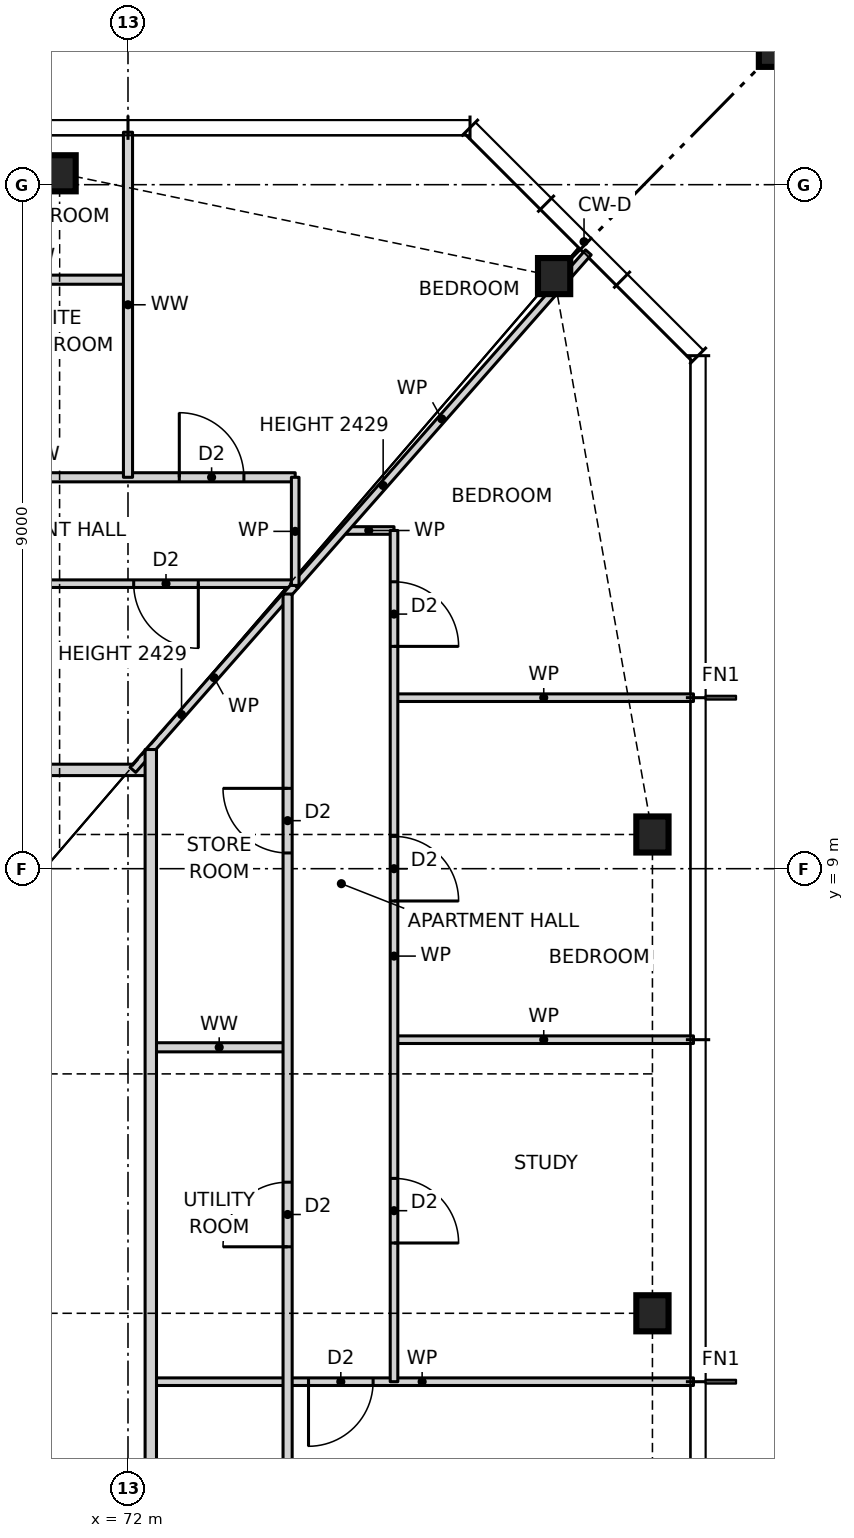
"""IFC4 building model, lengths in metres.
Left out: names, types, materials, properties, quantities, classifications, styles, units other than length and angle.
Written with IfcOpenShell. Run it as: python <this file> out.ifc"""

import sys

from ifc_helpers import new_model, si_unit, direction, frame, frame_2d, origin, origin_2d, place, context, subcontext, project, spatial, rectangle, hollow_rectangle, i_section, extrude, element, fill, save


model = new_model("IFC4")
c1 = context("Model", 3, precision=1e-05, world=origin(), true_north=direction((0.0, 1.0)))
c2 = subcontext(c1, "Body", "Model", "MODEL_VIEW")
j1 = project(units=[si_unit("LENGTHUNIT", "METRE"), si_unit("PLANEANGLEUNIT", "RADIAN")], contexts=[c1])
p1 = place(None, origin())
s1 = spatial("IfcSite", under=j1, at=p1, CompositionType="ELEMENT")
p2 = place(p1, origin())
s2 = spatial("IfcBuilding", under=s1, at=p2, CompositionType="ELEMENT")
p3 = place(p2, frame((0.0, 0.0, 18.5)))
s3 = spatial("IfcBuildingStorey", under=s2, at=p3, CompositionType="ELEMENT", Elevation=18.5)
for number, where, z_axis, x_axis in (
    (1, (78.9, 3.15, 0.0), (0.0, 0.0, 1.0), (1.0, 0.0, 0.0)),
    (2, (78.9, 9.45, 0.0), (0.0, 0.0, 1.0), (1.0, 0.0, 0.0)),
    (3, (77.606, 16.797, 0.0), (0.0, 0.0, 1.0), (1.0, 0.0, 0.0)),
    (4, (71.1, 18.15, 0.0), (0.0, 0.0, 1.0), (1.0, 0.0, 0.0)),
):
    element("IfcColumn", number, at=place(p3, frame(where, z_axis=z_axis, x_axis=x_axis)), inside=s3, PredefinedType="COLUMN", context=c2, shape_type="SweptSolid", body=[
        extrude(i_section(OverallWidth=0.424, OverallDepth=0.475, WebThickness=0.048, FlangeThickness=0.077, at=origin_2d()), origin(), (0.0, 0.0, 1.0), 3.5),
    ])
p4 = place(p3, frame((80.9, 20.15, 0.0), z_axis=(0.0, 0.0, 1.0), x_axis=(1.0, 0.0, 0.0)))
e5 = element("IfcColumn", 5, at=p4, inside=s3, PredefinedType="COLUMN", context=c2, shape_type="SweptSolid", body=[
    extrude(hollow_rectangle(XDim=1.2, YDim=1.2, WallThickness=0.07, at=origin_2d()), origin(), (0.0, 0.0, 1.0), 3.5),
])
p5 = place(p3, frame((72.3, 2.25, 0.0), z_axis=(0.0, 0.0, 1.0), x_axis=(1.0, 0.0, 0.0)))
e6 = element("IfcWall", 6, at=p5, inside=s3, PredefinedType="PARTITIONING", context=c2, shape_type="SweptSolid", body=[
    extrude(rectangle(XDim=7.14, YDim=0.1, at=frame_2d((3.57, 0.0))), origin(), (0.0, 0.0, 1.0), 3.27),
])
p6 = place(p5, frame((2.075, 0.0, 0.0)))
e7 = element("IfcOpeningElement", 7, at=p6, cuts=e6, PredefinedType="OPENING", context=c2, shape_type="SweptSolid", body=[
    extrude(rectangle(XDim=0.85, YDim=2.1, at=frame_2d((0.425, 1.05))), frame((0.0, 0.06, 0.0), z_axis=(0.0, -1.0, 0.0), x_axis=(1.0, 0.0, 0.0)), (0.0, 0.0, 1.0), 0.12),
])
p7 = place(p3, frame((72.3, 6.65, 0.0), z_axis=(0.0, 0.0, 1.0), x_axis=(1.0, 0.0, 0.0)))
e8 = element("IfcWall", 8, at=p7, inside=s3, PredefinedType="PARTITIONING", context=c2, shape_type="SweptSolid", body=[
    extrude(rectangle(XDim=1.8, YDim=0.12, at=frame_2d((0.9, 0.0))), origin(), (0.0, 0.0, 1.0), 3.27),
])
p8 = place(p3, frame((75.5, 6.75, 0.0), z_axis=(0.0, 0.0, 1.0), x_axis=(1.0, 0.0, 0.0)))
e9 = element("IfcWall", 9, at=p8, inside=s3, PredefinedType="PARTITIONING", context=c2, shape_type="SweptSolid", body=[
    extrude(rectangle(XDim=3.94, YDim=0.1, at=frame_2d((1.97, 0.0))), origin(), (0.0, 0.0, 1.0), 3.27),
])
p9 = place(p3, frame((53.7, 10.3, 0.0), z_axis=(0.0, 0.0, 1.0), x_axis=(1.0, 0.0, 0.0)))
e10 = element("IfcWall", 10, at=p9, inside=s3, PredefinedType="PARTITIONING", context=c2, shape_type="SweptSolid", body=[
    extrude(rectangle(XDim=18.6, YDim=0.15, at=frame_2d((9.3, 0.0))), origin(), (0.0, 0.0, 1.0), 3.27),
])
p10 = place(p9, frame((8.3, 0.0, 0.0)))
e11 = element("IfcOpeningElement", 11, at=p10, cuts=e10, PredefinedType="OPENING", context=c2, shape_type="SweptSolid", body=[
    extrude(rectangle(XDim=1.0, YDim=2.1, at=frame_2d((0.5, 1.05))), frame((0.0, 0.085, 0.0), z_axis=(0.0, -1.0, 0.0), x_axis=(1.0, 0.0, 0.0)), (0.0, 0.0, 1.0), 0.17),
])
p11 = place(p3, frame((75.5, 11.25, 0.0), z_axis=(0.0, 0.0, 1.0), x_axis=(1.0, 0.0, 0.0)))
e12 = element("IfcWall", 12, at=p11, inside=s3, PredefinedType="PARTITIONING", context=c2, shape_type="SweptSolid", body=[
    extrude(rectangle(XDim=3.94, YDim=0.1, at=frame_2d((1.97, 0.0))), origin(), (0.0, 0.0, 1.0), 3.27),
])
p12 = place(p3, frame((51.8, 12.75, 0.0), z_axis=(0.0, 0.0, 1.0), x_axis=(1.0, 0.0, 0.0)))
e13 = element("IfcWall", 13, at=p12, inside=s3, PredefinedType="PARTITIONING", context=c2, shape_type="SweptSolid", body=[
    extrude(rectangle(XDim=22.4, YDim=0.1, at=frame_2d((11.2, 0.0))), origin(), (0.0, 0.0, 1.0), 3.27),
])
p13 = place(p12, frame((13.475, 0.0, 0.0)))
e14 = element("IfcOpeningElement", 14, at=p13, cuts=e13, PredefinedType="OPENING", context=c2, shape_type="SweptSolid", body=[
    extrude(rectangle(XDim=0.85, YDim=2.1, at=frame_2d((0.425, 1.05))), frame((0.0, 0.06, 0.0), z_axis=(0.0, -1.0, 0.0), x_axis=(1.0, 0.0, 0.0)), (0.0, 0.0, 1.0), 0.12),
])
p14 = place(p12, frame((10.275, 0.0, 0.0)))
e15 = element("IfcOpeningElement", 15, at=p14, cuts=e13, PredefinedType="OPENING", context=c2, shape_type="SweptSolid", body=[
    extrude(rectangle(XDim=0.85, YDim=2.1, at=frame_2d((0.425, 1.05))), frame((0.0, 0.06, 0.0), z_axis=(0.0, -1.0, 0.0), x_axis=(1.0, 0.0, 0.0)), (0.0, 0.0, 1.0), 0.12),
])
p15 = place(p12, frame((16.925, 0.0, 0.0)))
e16 = element("IfcOpeningElement", 16, at=p15, cuts=e13, PredefinedType="OPENING", context=c2, shape_type="SweptSolid", body=[
    extrude(rectangle(XDim=0.85, YDim=2.1, at=frame_2d((0.425, 1.05))), frame((0.0, 0.06, 0.0), z_axis=(0.0, -1.0, 0.0), x_axis=(1.0, 0.0, 0.0)), (0.0, 0.0, 1.0), 0.12),
])
p16 = place(p12, frame((20.275, 0.0, 0.0)))
e17 = element("IfcOpeningElement", 17, at=p16, cuts=e13, PredefinedType="OPENING", context=c2, shape_type="SweptSolid", body=[
    extrude(rectangle(XDim=0.85, YDim=2.1, at=frame_2d((0.425, 1.05))), frame((0.0, 0.06, 0.0), z_axis=(0.0, -1.0, 0.0), x_axis=(1.0, 0.0, 0.0)), (0.0, 0.0, 1.0), 0.12),
])
p17 = place(p12, frame((4.625, 0.0, 0.0)))
e18 = element("IfcOpeningElement", 18, at=p17, cuts=e13, PredefinedType="OPENING", context=c2, shape_type="SweptSolid", body=[
    extrude(rectangle(XDim=0.85, YDim=2.1, at=frame_2d((0.425, 1.05))), frame((0.0, 0.06, 0.0), z_axis=(0.0, -1.0, 0.0), x_axis=(1.0, 0.0, 0.0)), (0.0, 0.0, 1.0), 0.12),
])
p18 = place(p12, frame((1.275, 0.0, 0.0)))
e19 = element("IfcOpeningElement", 19, at=p18, cuts=e13, PredefinedType="OPENING", context=c2, shape_type="SweptSolid", body=[
    extrude(rectangle(XDim=0.85, YDim=2.1, at=frame_2d((0.425, 1.05))), frame((0.0, 0.06, 0.0), z_axis=(0.0, -1.0, 0.0), x_axis=(1.0, 0.0, 0.0)), (0.0, 0.0, 1.0), 0.12),
])
p19 = place(p3, frame((74.836, 13.45, 0.0), z_axis=(0.0, 0.0, 1.0), x_axis=(1.0, 0.0, 0.0)))
e20 = element("IfcWall", 20, at=p19, inside=s3, PredefinedType="PARTITIONING", context=c2, shape_type="SweptSolid", body=[
    extrude(rectangle(XDim=0.664, YDim=0.1, at=frame_2d((0.332, 0.0))), origin(), (0.0, 0.0, 1.0), 3.27),
])
p20 = place(p3, frame((67.5, 14.15, 0.0), z_axis=(0.0, 0.0, 1.0), x_axis=(1.0, 0.0, 0.0)))
e21 = element("IfcWall", 21, at=p20, inside=s3, PredefinedType="PARTITIONING", context=c2, shape_type="SweptSolid", body=[
    extrude(rectangle(XDim=6.7, YDim=0.12, at=frame_2d((3.35, 0.0))), origin(), (0.0, 0.0, 1.0), 3.27),
])
p21 = place(p20, frame((0.625, 0.0, 0.0)))
e22 = element("IfcOpeningElement", 22, at=p21, cuts=e21, PredefinedType="OPENING", context=c2, shape_type="SweptSolid", body=[
    extrude(rectangle(XDim=0.85, YDim=2.1, at=frame_2d((0.425, 1.05))), frame((0.0, 0.07, 0.0), z_axis=(0.0, -1.0, 0.0), x_axis=(1.0, 0.0, 0.0)), (0.0, 0.0, 1.0), 0.14),
])
p22 = place(p20, frame((5.175, 0.0, 0.0)))
e23 = element("IfcOpeningElement", 23, at=p22, cuts=e21, PredefinedType="OPENING", context=c2, shape_type="SweptSolid", body=[
    extrude(rectangle(XDim=0.85, YDim=2.1, at=frame_2d((0.425, 1.05))), frame((0.0, 0.07, 0.0), z_axis=(0.0, -1.0, 0.0), x_axis=(1.0, 0.0, 0.0)), (0.0, 0.0, 1.0), 0.14),
])
p23 = place(p3, frame((69.6, 16.75, 0.0), z_axis=(0.0, 0.0, 1.0), x_axis=(1.0, 0.0, 0.0)))
e24 = element("IfcWall", 24, at=p23, inside=s3, PredefinedType="PARTITIONING", context=c2, shape_type="SweptSolid", body=[
    extrude(rectangle(XDim=2.4, YDim=0.12, at=frame_2d((1.2, 0.0))), origin(), (0.0, 0.0, 1.0), 3.27),
])
p24 = place(p3, frame((72.064, 10.3, 0.0), z_axis=(0.0, 0.0, 1.0), x_axis=(0.660667046586, 0.75067906162, 0.0)))
e25 = element("IfcWall", 25, at=p24, inside=s3, PredefinedType="PARTITIONING", context=c2, shape_type="SweptSolid", body=[
    extrude(rectangle(XDim=3.233, YDim=0.1, at=frame_2d((1.617, 0.0))), origin(), (0.0, 0.0, 1.0), 2.429),
])
p25 = place(p3, frame((74.2, 12.727, 0.0), z_axis=(0.0, 0.0, 1.0), x_axis=(0.660698595885, 0.750651294141, 0.0)))
e26 = element("IfcWall", 26, at=p25, inside=s3, PredefinedType="PARTITIONING", context=c2, shape_type="SweptSolid", body=[
    extrude(rectangle(XDim=5.838, YDim=0.1, at=frame_2d((2.919, 0.0))), origin(), (0.0, 0.0, 1.0), 2.429),
])
p26 = place(p3, frame((75.5, 2.25, 0.0), z_axis=(0.0, 0.0, 1.0), x_axis=(0.0, 1.0, 0.0)))
e27 = element("IfcWall", 27, at=p26, inside=s3, PredefinedType="PARTITIONING", context=c2, shape_type="SweptSolid", body=[
    extrude(rectangle(XDim=11.2, YDim=0.1, at=frame_2d((5.6, 0.0))), origin(), (0.0, 0.0, 1.0), 3.27),
])
p27 = place(p26, frame((1.825, 0.0, 0.0)))
e28 = element("IfcOpeningElement", 28, at=p27, cuts=e27, PredefinedType="OPENING", context=c2, shape_type="SweptSolid", body=[
    extrude(rectangle(XDim=0.85, YDim=2.1, at=frame_2d((0.425, 1.05))), frame((0.0, 0.06, 0.0), z_axis=(0.0, -1.0, 0.0), x_axis=(1.0, 0.0, 0.0)), (0.0, 0.0, 1.0), 0.12),
])
p28 = place(p26, frame((6.325, 0.0, 0.0)))
e29 = element("IfcOpeningElement", 29, at=p28, cuts=e27, PredefinedType="OPENING", context=c2, shape_type="SweptSolid", body=[
    extrude(rectangle(XDim=0.85, YDim=2.1, at=frame_2d((0.425, 1.05))), frame((0.0, 0.06, 0.0), z_axis=(0.0, -1.0, 0.0), x_axis=(1.0, 0.0, 0.0)), (0.0, 0.0, 1.0), 0.12),
])
p29 = place(p26, frame((9.675, 0.0, 0.0)))
e30 = element("IfcOpeningElement", 30, at=p29, cuts=e27, PredefinedType="OPENING", context=c2, shape_type="SweptSolid", body=[
    extrude(rectangle(XDim=0.85, YDim=2.1, at=frame_2d((0.425, 1.05))), frame((0.0, 0.06, 0.0), z_axis=(0.0, -1.0, 0.0), x_axis=(1.0, 0.0, 0.0)), (0.0, 0.0, 1.0), 0.12),
])
p30 = place(p3, frame((74.2, 12.727, 0.0), z_axis=(0.0, 0.0, 1.0), x_axis=(0.0, 1.0, 0.0)))
e31 = element("IfcWall", 31, at=p30, inside=s3, PredefinedType="PARTITIONING", context=c2, shape_type="SweptSolid", body=[
    extrude(rectangle(XDim=1.423, YDim=0.1, at=frame_2d((0.711, 0.0))), origin(), (0.0, 0.0, 1.0), 3.27),
])
p31 = place(p3, frame((74.1, -12.614, 0.0), z_axis=(0.0, 0.0, 1.0), x_axis=(0.0, 1.0, 0.0)))
e32 = element("IfcWall", 32, at=p31, inside=s3, PredefinedType="PARTITIONING", context=c2, shape_type="SweptSolid", body=[
    extrude(rectangle(XDim=25.228, YDim=0.12, at=frame_2d((12.614, 0.0))), origin(), (0.0, 0.0, 1.0), 3.27),
])
p32 = place(p31, frame((7.239, 0.0, 0.0)))
e33 = element("IfcOpeningElement", 33, at=p32, cuts=e32, PredefinedType="OPENING", context=c2, shape_type="SweptSolid", body=[
    extrude(rectangle(XDim=0.85, YDim=2.1, at=frame_2d((0.425, 1.05))), frame((0.0, 0.07, 0.0), z_axis=(0.0, -1.0, 0.0), x_axis=(1.0, 0.0, 0.0)), (0.0, 0.0, 1.0), 0.14),
])
p33 = place(p31, frame((10.439, 0.0, 0.0)))
e34 = element("IfcOpeningElement", 34, at=p33, cuts=e32, PredefinedType="OPENING", context=c2, shape_type="SweptSolid", body=[
    extrude(rectangle(XDim=0.85, YDim=2.1, at=frame_2d((0.425, 1.05))), frame((0.0, 0.07, 0.0), z_axis=(0.0, -1.0, 0.0), x_axis=(1.0, 0.0, 0.0)), (0.0, 0.0, 1.0), 0.14),
])
p34 = place(p31, frame((2.507, 0.0, 0.0)))
e35 = element("IfcOpeningElement", 35, at=p34, cuts=e32, PredefinedType="OPENING", context=c2, shape_type="SweptSolid", body=[
    extrude(rectangle(XDim=0.85, YDim=2.1, at=frame_2d((0.425, 1.05))), frame((0.0, 0.07, 0.0), z_axis=(0.0, -1.0, 0.0), x_axis=(1.0, 0.0, 0.0)), (0.0, 0.0, 1.0), 0.14),
])
p35 = place(p31, frame((16.639, 0.0, 0.0)))
e36 = element("IfcOpeningElement", 36, at=p35, cuts=e32, PredefinedType="OPENING", context=c2, shape_type="SweptSolid", body=[
    extrude(rectangle(XDim=0.85, YDim=2.1, at=frame_2d((0.425, 1.05))), frame((0.0, 0.07, 0.0), z_axis=(0.0, -1.0, 0.0), x_axis=(1.0, 0.0, 0.0)), (0.0, 0.0, 1.0), 0.14),
])
p36 = place(p31, frame((21.821, 0.0, 0.0)))
e37 = element("IfcOpeningElement", 37, at=p36, cuts=e32, PredefinedType="OPENING", context=c2, shape_type="SweptSolid", body=[
    extrude(rectangle(XDim=0.85, YDim=2.1, at=frame_2d((0.425, 1.05))), frame((0.0, 0.07, 0.0), z_axis=(0.0, -1.0, 0.0), x_axis=(1.0, 0.0, 0.0)), (0.0, 0.0, 1.0), 0.14),
])
p37 = place(p3, frame((72.3, -10.9, 0.0), z_axis=(0.0, 0.0, 1.0), x_axis=(0.0, 1.0, 0.0)))
e38 = element("IfcWall", 38, at=p37, inside=s3, PredefinedType="PARTITIONING", context=c2, shape_type="SweptSolid", body=[
    extrude(rectangle(XDim=21.468, YDim=0.15, at=frame_2d((10.734, 0.0))), origin(), (0.0, 0.0, 1.0), 3.27),
])
p38 = place(p37, frame((8.65, 0.0, 0.0)))
e39 = element("IfcOpeningElement", 39, at=p38, cuts=e38, PredefinedType="OPENING", context=c2, shape_type="SweptSolid", body=[
    extrude(rectangle(XDim=1.0, YDim=2.1, at=frame_2d((0.5, 1.05))), frame((0.0, 0.085, 0.0), z_axis=(0.0, -1.0, 0.0), x_axis=(1.0, 0.0, 0.0)), (0.0, 0.0, 1.0), 0.17),
])
p39 = place(p3, frame((72.0, 14.15, 0.0), z_axis=(0.0, 0.0, 1.0), x_axis=(0.0, 1.0, 0.0)))
e40 = element("IfcWall", 40, at=p39, inside=s3, PredefinedType="PARTITIONING", context=c2, shape_type="SweptSolid", body=[
    extrude(rectangle(XDim=4.54, YDim=0.12, at=frame_2d((2.27, 0.0))), origin(), (0.0, 0.0, 1.0), 3.27),
])
p40 = place(p6, frame((0.85, 0.0, 0.0), z_axis=(0.0, 0.0, 1.0), x_axis=(-1.0, 0.0, 0.0)))
e41 = element("IfcDoor", 41, at=p40, inside=s3, OperationType="SINGLE_SWING_RIGHT", PredefinedType="DOOR", context=c2, shape_type="SweptSolid", body=[
    extrude(rectangle(XDim=0.85, YDim=2.1, at=frame_2d((0.425, 1.05))), frame((0.0, 0.025, 0.0), z_axis=(0.0, -1.0, 0.0), x_axis=(1.0, 0.0, 0.0)), (0.0, 0.0, 1.0), 0.05),
])
fill(e7, e41)
p41 = place(p27, frame((0.85, 0.0, 0.0), z_axis=(0.0, 0.0, 1.0), x_axis=(-1.0, 0.0, 0.0)))
e42 = element("IfcDoor", 42, at=p41, inside=s3, OperationType="SINGLE_SWING_RIGHT", PredefinedType="DOOR", context=c2, shape_type="SweptSolid", body=[
    extrude(rectangle(XDim=0.85, YDim=2.1, at=frame_2d((0.425, 1.05))), frame((0.0, 0.025, 0.0), z_axis=(0.0, -1.0, 0.0), x_axis=(1.0, 0.0, 0.0)), (0.0, 0.0, 1.0), 0.05),
])
fill(e28, e42)
p42 = place(p28, frame((0.85, 0.0, 0.0), z_axis=(0.0, 0.0, 1.0), x_axis=(-1.0, 0.0, 0.0)))
e43 = element("IfcDoor", 43, at=p42, inside=s3, OperationType="SINGLE_SWING_RIGHT", PredefinedType="DOOR", context=c2, shape_type="SweptSolid", body=[
    extrude(rectangle(XDim=0.85, YDim=2.1, at=frame_2d((0.425, 1.05))), frame((0.0, 0.025, 0.0), z_axis=(0.0, -1.0, 0.0), x_axis=(1.0, 0.0, 0.0)), (0.0, 0.0, 1.0), 0.05),
])
fill(e29, e43)
p43 = place(p29, frame((0.85, 0.0, 0.0), z_axis=(0.0, 0.0, 1.0), x_axis=(-1.0, 0.0, 0.0)))
e44 = element("IfcDoor", 44, at=p43, inside=s3, OperationType="SINGLE_SWING_RIGHT", PredefinedType="DOOR", context=c2, shape_type="SweptSolid", body=[
    extrude(rectangle(XDim=0.85, YDim=2.1, at=frame_2d((0.425, 1.05))), frame((0.0, 0.025, 0.0), z_axis=(0.0, -1.0, 0.0), x_axis=(1.0, 0.0, 0.0)), (0.0, 0.0, 1.0), 0.05),
])
fill(e30, e44)
p44 = place(p35, origin())
e45 = element("IfcDoor", 45, at=p44, inside=s3, OperationType="SINGLE_SWING_LEFT", PredefinedType="DOOR", context=c2, shape_type="SweptSolid", body=[
    extrude(rectangle(XDim=0.85, YDim=2.1, at=frame_2d((0.425, 1.05))), frame((0.0, 0.025, 0.0), z_axis=(0.0, -1.0, 0.0), x_axis=(1.0, 0.0, 0.0)), (0.0, 0.0, 1.0), 0.05),
])
fill(e36, e45)
p45 = place(p36, origin())
e46 = element("IfcDoor", 46, at=p45, inside=s3, OperationType="SINGLE_SWING_RIGHT", PredefinedType="DOOR", context=c2, shape_type="SweptSolid", body=[
    extrude(rectangle(XDim=0.85, YDim=2.1, at=frame_2d((0.425, 1.05))), frame((0.0, 0.025, 0.0), z_axis=(0.0, -1.0, 0.0), x_axis=(1.0, 0.0, 0.0)), (0.0, 0.0, 1.0), 0.05),
])
fill(e37, e46)
p46 = place(p22, origin())
e47 = element("IfcDoor", 47, at=p46, inside=s3, OperationType="SINGLE_SWING_LEFT", PredefinedType="DOOR", context=c2, shape_type="SweptSolid", body=[
    extrude(rectangle(XDim=0.85, YDim=2.1, at=frame_2d((0.425, 1.05))), frame((0.0, 0.025, 0.0), z_axis=(0.0, -1.0, 0.0), x_axis=(1.0, 0.0, 0.0)), (0.0, 0.0, 1.0), 0.05),
])
fill(e23, e47)
p47 = place(p16, frame((0.85, 0.0, 0.0), z_axis=(0.0, 0.0, 1.0), x_axis=(-1.0, 0.0, 0.0)))
e48 = element("IfcDoor", 48, at=p47, inside=s3, OperationType="SINGLE_SWING_LEFT", PredefinedType="DOOR", context=c2, shape_type="SweptSolid", body=[
    extrude(rectangle(XDim=0.85, YDim=2.1, at=frame_2d((0.425, 1.05))), frame((0.0, 0.025, 0.0), z_axis=(0.0, -1.0, 0.0), x_axis=(1.0, 0.0, 0.0)), (0.0, 0.0, 1.0), 0.05),
])
fill(e17, e48)
save(model, sys.argv[1])
